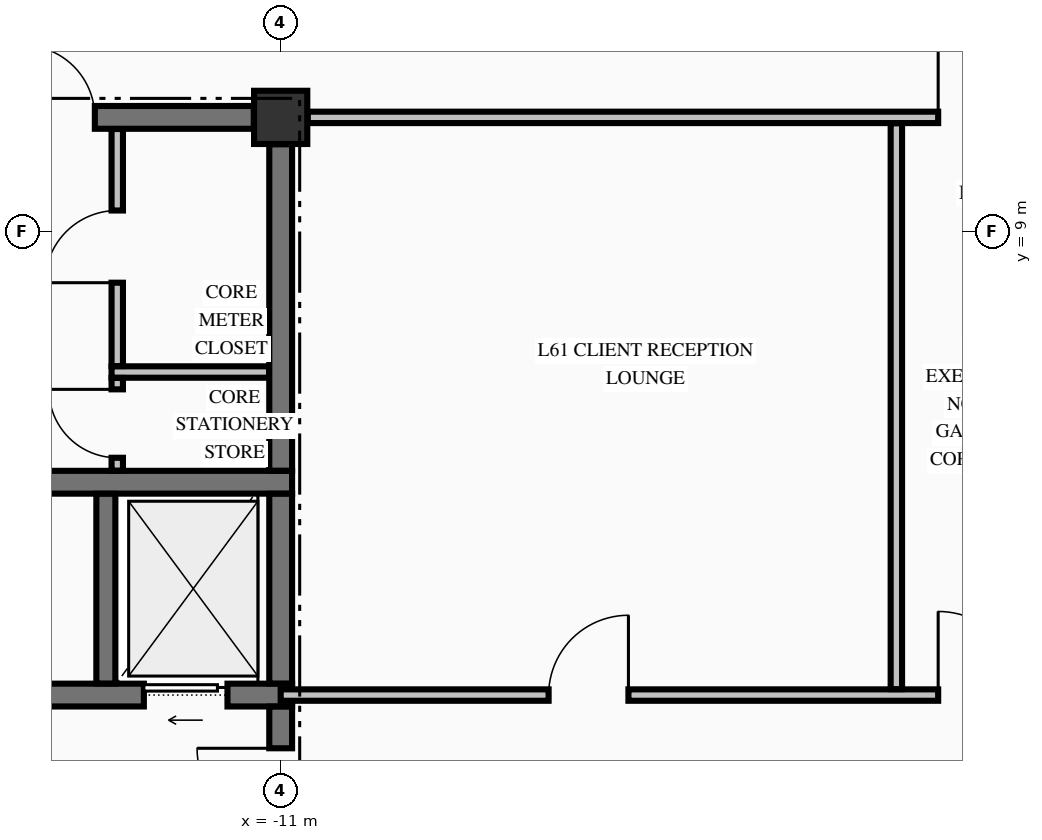
"""IFC4 building model, lengths in metres.
Left out: names, types, materials, properties, quantities, classifications, styles, units other than length and angle.
Written with IfcOpenShell. Run it as: python <this file> out.ifc"""

import sys

from ifc_helpers import new_model, si_unit, direction, frame, frame_2d, origin, origin_2d, place, context, subcontext, project, spatial, rectangle, extrude, element, fill, save


model = new_model("IFC4")
c1 = context("Model", 3, precision=1e-05, world=origin(), true_north=direction((0.0, 1.0)))
c2 = subcontext(c1, "Body", "Model", "MODEL_VIEW")
j1 = project(units=[si_unit("LENGTHUNIT", "METRE"), si_unit("PLANEANGLEUNIT", "RADIAN")], contexts=[c1])
p1 = place(None, origin())
s1 = spatial("IfcSite", under=j1, at=p1, CompositionType="ELEMENT")
p2 = place(p1, origin())
s2 = spatial("IfcBuilding", under=s1, at=p2, CompositionType="ELEMENT")
p3 = place(p2, frame((0.0, 0.0, 233.28)))
s3 = spatial("IfcBuildingStorey", under=s2, at=p3, CompositionType="ELEMENT", Elevation=233.28)
p4 = place(p3, frame((-11.0, 10.5, -0.25), z_axis=(0.0, 0.0, 1.0), x_axis=(1.0, 0.0, 0.0)))
e1 = element("IfcColumn", 1, at=p4, inside=s3, PredefinedType="COLUMN", context=c2, shape_type="SweptSolid", body=[
    extrude(rectangle(XDim=0.7, YDim=0.7, at=origin_2d()), origin(), (0.0, 0.0, 1.0), 3.23),
])
p5 = place(p3, frame((-14.875, 2.9, 0.0), z_axis=(0.0, 0.0, 1.0), x_axis=(1.0, 0.0, 0.0)))
e2 = element("IfcWall", 2, at=p5, inside=s3, PredefinedType="SHEAR", context=c2, shape_type="SweptSolid", body=[
    extrude(rectangle(XDim=4.025, YDim=0.3, at=frame_2d((2.012, 0.0))), origin(), (0.0, 0.0, 1.0), 2.98),
])
p6 = place(p5, frame((2.075, 0.0, 0.0)))
e3 = element("IfcOpeningElement", 3, at=p6, cuts=e2, PredefinedType="OPENING", context=c2, shape_type="SweptSolid", body=[
    extrude(rectangle(XDim=1.1, YDim=2.2, at=frame_2d((0.55, 1.1))), frame((0.0, 0.16, 0.0), z_axis=(0.0, -1.0, 0.0), x_axis=(1.0, 0.0, 0.0)), (0.0, 0.0, 1.0), 0.32),
])
p7 = place(p3, frame((-14.875, 5.7, 0.0), z_axis=(0.0, 0.0, 1.0), x_axis=(1.0, 0.0, 0.0)))
e4 = element("IfcWall", 4, at=p7, inside=s3, PredefinedType="SHEAR", context=c2, shape_type="SweptSolid", body=[
    extrude(rectangle(XDim=4.025, YDim=0.3, at=frame_2d((2.012, 0.0))), origin(), (0.0, 0.0, 1.0), 2.98),
])
p8 = place(p3, frame((-14.7, 10.5, 0.0), z_axis=(0.0, 0.0, 1.0), x_axis=(1.0, 0.0, 0.0)))
e5 = element("IfcWall", 5, at=p8, inside=s3, PredefinedType="SHEAR", context=c2, shape_type="SweptSolid", body=[
    extrude(rectangle(XDim=3.346, YDim=0.3, at=frame_2d((1.673, 0.0))), origin(), (0.0, 0.0, 1.0), 2.98),
])
p9 = place(p8, frame((0.305, 0.0, 0.0)))
e6 = element("IfcOpeningElement", 6, at=p9, cuts=e5, PredefinedType="OPENING", context=c2, shape_type="SweptSolid", body=[
    extrude(rectangle(XDim=0.95, YDim=2.15, at=frame_2d((0.475, 1.075))), frame((0.0, 0.16, 0.0), z_axis=(0.0, -1.0, 0.0), x_axis=(1.0, 0.0, 0.0)), (0.0, 0.0, 1.0), 0.32),
])
p10 = place(p3, frame((-11.0, 2.9, 0.0), z_axis=(0.0, 0.0, 1.0), x_axis=(1.0, 0.0, 0.0)))
e7 = element("IfcWall", 7, at=p10, inside=s3, PredefinedType="PARTITIONING", context=c2, shape_type="SweptSolid", body=[
    extrude(rectangle(XDim=22.0, YDim=0.15, at=frame_2d((11.0, 0.0))), origin(), (0.0, 0.0, 1.0), 2.98),
])
p11 = place(p10, frame((8.65, 0.0, 0.0)))
e8 = element("IfcOpeningElement", 8, at=p11, cuts=e7, PredefinedType="OPENING", context=c2, shape_type="SweptSolid", body=[
    extrude(rectangle(XDim=1.1, YDim=2.15, at=frame_2d((0.55, 1.075))), frame((0.0, 0.085, 0.0), z_axis=(0.0, -1.0, 0.0), x_axis=(1.0, 0.0, 0.0)), (0.0, 0.0, 1.0), 0.17),
])
p12 = place(p10, frame((3.525, 0.0, 0.0)))
e9 = element("IfcOpeningElement", 9, at=p12, cuts=e7, PredefinedType="OPENING", context=c2, shape_type="SweptSolid", body=[
    extrude(rectangle(XDim=1.05, YDim=2.15, at=frame_2d((0.525, 1.075))), frame((0.0, 0.085, 0.0), z_axis=(0.0, -1.0, 0.0), x_axis=(1.0, 0.0, 0.0)), (0.0, 0.0, 1.0), 0.17),
])
p13 = place(p10, frame((12.225, 0.0, 0.0)))
e10 = element("IfcOpeningElement", 10, at=p13, cuts=e7, PredefinedType="OPENING", context=c2, shape_type="SweptSolid", body=[
    extrude(rectangle(XDim=0.95, YDim=2.15, at=frame_2d((0.475, 1.075))), frame((0.0, 0.085, 0.0), z_axis=(0.0, -1.0, 0.0), x_axis=(1.0, 0.0, 0.0)), (0.0, 0.0, 1.0), 0.17),
])
p14 = place(p10, frame((18.075, 0.0, 0.0)))
e11 = element("IfcOpeningElement", 11, at=p14, cuts=e7, PredefinedType="OPENING", context=c2, shape_type="SweptSolid", body=[
    extrude(rectangle(XDim=0.95, YDim=2.15, at=frame_2d((0.475, 1.075))), frame((0.0, 0.085, 0.0), z_axis=(0.0, -1.0, 0.0), x_axis=(1.0, 0.0, 0.0)), (0.0, 0.0, 1.0), 0.17),
])
p15 = place(p3, frame((-13.225, 7.15, 0.0), z_axis=(0.0, 0.0, 1.0), x_axis=(1.0, 0.0, 0.0)))
e12 = element("IfcWall", 12, at=p15, inside=s3, PredefinedType="PARTITIONING", context=c2, shape_type="SweptSolid", body=[
    extrude(rectangle(XDim=2.072, YDim=0.15, at=frame_2d((1.036, 0.0))), origin(), (0.0, 0.0, 1.0), 2.98),
])
p16 = place(p3, frame((-10.644, 10.5, 0.0), z_axis=(0.0, 0.0, 1.0), x_axis=(1.0, 0.0, 0.0)))
e13 = element("IfcWall", 13, at=p16, inside=s3, PredefinedType="PARTITIONING", context=c2, shape_type="SweptSolid", body=[
    extrude(rectangle(XDim=21.288, YDim=0.15, at=frame_2d((10.644, 0.0))), origin(), (0.0, 0.0, 1.0), 2.98),
])
p17 = place(p16, frame((8.294, 0.0, 0.0)))
e14 = element("IfcOpeningElement", 14, at=p17, cuts=e13, PredefinedType="OPENING", context=c2, shape_type="SweptSolid", body=[
    extrude(rectangle(XDim=1.1, YDim=2.15, at=frame_2d((0.55, 1.075))), frame((0.0, 0.085, 0.0), z_axis=(0.0, -1.0, 0.0), x_axis=(1.0, 0.0, 0.0)), (0.0, 0.0, 1.0), 0.17),
])
p18 = place(p3, frame((-13.3, 3.052, 0.0), z_axis=(0.0, 0.0, 1.0), x_axis=(0.0, 1.0, 0.0)))
e15 = element("IfcWall", 15, at=p18, inside=s3, PredefinedType="SOLIDWALL", context=c2, shape_type="SweptSolid", body=[
    extrude(rectangle(XDim=2.496, YDim=0.25, at=frame_2d((1.248, 0.0))), origin(), (0.0, 0.0, 1.0), 2.98),
])
p19 = place(p3, frame((-11.0, 0.354, 0.0), z_axis=(0.0, 0.0, 1.0), x_axis=(0.0, 1.0, 0.0)))
e16 = element("IfcWall", 16, at=p19, inside=s3, PredefinedType="SHEAR", context=c2, shape_type="SweptSolid", body=[
    extrude(rectangle(XDim=2.394, YDim=0.3, at=frame_2d((1.197, 0.0))), origin(), (0.0, 0.0, 1.0), 2.98),
])
p20 = place(p19, frame((0.746, 0.0, 0.0)))
e17 = element("IfcOpeningElement", 17, at=p20, cuts=e16, PredefinedType="OPENING", context=c2, shape_type="SweptSolid", body=[
    extrude(rectangle(XDim=1.1, YDim=2.15, at=frame_2d((0.55, 1.075))), frame((0.0, 0.16, 0.0), z_axis=(0.0, -1.0, 0.0), x_axis=(1.0, 0.0, 0.0)), (0.0, 0.0, 1.0), 0.32),
])
p21 = place(p3, frame((-11.0, 3.052, 0.0), z_axis=(0.0, 0.0, 1.0), x_axis=(0.0, 1.0, 0.0)))
e18 = element("IfcWall", 18, at=p21, inside=s3, PredefinedType="SHEAR", context=c2, shape_type="SweptSolid", body=[
    extrude(rectangle(XDim=2.496, YDim=0.3, at=frame_2d((1.248, 0.0))), origin(), (0.0, 0.0, 1.0), 2.98),
])
p22 = place(p3, frame((-11.0, 5.852, 0.0), z_axis=(0.0, 0.0, 1.0), x_axis=(0.0, 1.0, 0.0)))
e19 = element("IfcWall", 19, at=p22, inside=s3, PredefinedType="SHEAR", context=c2, shape_type="SweptSolid", body=[
    extrude(rectangle(XDim=4.294, YDim=0.3, at=frame_2d((2.147, 0.0))), origin(), (0.0, 0.0, 1.0), 2.98),
])
p23 = place(p3, frame((-13.15, 5.853, 0.0), z_axis=(0.0, 0.0, 1.0), x_axis=(0.0, 1.0, 0.0)))
e20 = element("IfcWall", 20, at=p23, inside=s3, PredefinedType="PARTITIONING", context=c2, shape_type="SweptSolid", body=[
    extrude(rectangle(XDim=1.219, YDim=0.15, at=frame_2d((0.609, 0.0))), origin(), (0.0, 0.0, 1.0), 2.98),
])
p24 = place(p23, frame((0.169, 0.0, 0.0)))
e21 = element("IfcOpeningElement", 21, at=p24, cuts=e20, PredefinedType="OPENING", context=c2, shape_type="SweptSolid", body=[
    extrude(rectangle(XDim=0.9, YDim=2.15, at=frame_2d((0.45, 1.075))), frame((0.0, 0.085, 0.0), z_axis=(0.0, -1.0, 0.0), x_axis=(1.0, 0.0, 0.0)), (0.0, 0.0, 1.0), 0.17),
])
p25 = place(p3, frame((-13.15, 7.228, 0.0), z_axis=(0.0, 0.0, 1.0), x_axis=(0.0, 1.0, 0.0)))
e22 = element("IfcWall", 22, at=p25, inside=s3, PredefinedType="PARTITIONING", context=c2, shape_type="SweptSolid", body=[
    extrude(rectangle(XDim=3.119, YDim=0.15, at=frame_2d((1.56, 0.0))), origin(), (0.0, 0.0, 1.0), 2.98),
])
p26 = place(p25, frame((1.097, 0.0, 0.0)))
e23 = element("IfcOpeningElement", 23, at=p26, cuts=e22, PredefinedType="OPENING", context=c2, shape_type="SweptSolid", body=[
    extrude(rectangle(XDim=0.95, YDim=2.15, at=frame_2d((0.475, 1.075))), frame((0.0, 0.085, 0.0), z_axis=(0.0, -1.0, 0.0), x_axis=(1.0, 0.0, 0.0)), (0.0, 0.0, 1.0), 0.17),
])
p27 = place(p3, frame((-2.9, 2.978, 0.0), z_axis=(0.0, 0.0, 1.0), x_axis=(0.0, 1.0, 0.0)))
e24 = element("IfcWall", 24, at=p27, inside=s3, PredefinedType="PARTITIONING", context=c2, shape_type="SweptSolid", body=[
    extrude(rectangle(XDim=7.444, YDim=0.15, at=frame_2d((3.722, 0.0))), origin(), (0.0, 0.0, 1.0), 2.98),
])
p28 = place(p20, origin())
e25 = element("IfcDoor", 25, at=p28, inside=s3, OperationType="SINGLE_SWING_RIGHT", PredefinedType="DOOR", context=c2, shape_type="SweptSolid", body=[
    extrude(rectangle(XDim=1.1, YDim=2.15, at=frame_2d((0.55, 1.075))), frame((0.0, 0.025, 0.0), z_axis=(0.0, -1.0, 0.0), x_axis=(1.0, 0.0, 0.0)), (0.0, 0.0, 1.0), 0.05),
])
fill(e17, e25)
p29 = place(p6, origin())
e26 = element("IfcDoor", 26, at=p29, inside=s3, OperationType="SLIDING_TO_LEFT", PredefinedType="DOOR", context=c2, shape_type="SweptSolid", body=[
    extrude(rectangle(XDim=1.1, YDim=2.2, at=frame_2d((0.55, 1.1))), frame((0.0, 0.025, 0.0), z_axis=(0.0, -1.0, 0.0), x_axis=(1.0, 0.0, 0.0)), (0.0, 0.0, 1.0), 0.05),
])
fill(e3, e26)
p30 = place(p9, origin())
e27 = element("IfcDoor", 27, at=p30, inside=s3, OperationType="SINGLE_SWING_LEFT", PredefinedType="DOOR", context=c2, shape_type="SweptSolid", body=[
    extrude(rectangle(XDim=0.95, YDim=2.15, at=frame_2d((0.475, 1.075))), frame((0.0, 0.025, 0.0), z_axis=(0.0, -1.0, 0.0), x_axis=(1.0, 0.0, 0.0)), (0.0, 0.0, 1.0), 0.05),
])
fill(e6, e27)
p31 = place(p24, origin())
e28 = element("IfcDoor", 28, at=p31, inside=s3, OperationType="SINGLE_SWING_RIGHT", PredefinedType="DOOR", context=c2, shape_type="SweptSolid", body=[
    extrude(rectangle(XDim=0.9, YDim=2.15, at=frame_2d((0.45, 1.075))), frame((0.0, 0.025, 0.0), z_axis=(0.0, -1.0, 0.0), x_axis=(1.0, 0.0, 0.0)), (0.0, 0.0, 1.0), 0.05),
])
fill(e21, e28)
p32 = place(p26, origin())
e29 = element("IfcDoor", 29, at=p32, inside=s3, OperationType="SINGLE_SWING_LEFT", PredefinedType="DOOR", context=c2, shape_type="SweptSolid", body=[
    extrude(rectangle(XDim=0.95, YDim=2.15, at=frame_2d((0.475, 1.075))), frame((0.0, 0.025, 0.0), z_axis=(0.0, -1.0, 0.0), x_axis=(1.0, 0.0, 0.0)), (0.0, 0.0, 1.0), 0.05),
])
fill(e23, e29)
p33 = place(p17, origin())
e30 = element("IfcDoor", 30, at=p33, inside=s3, OperationType="SINGLE_SWING_LEFT", PredefinedType="DOOR", context=c2, shape_type="SweptSolid", body=[
    extrude(rectangle(XDim=1.1, YDim=2.15, at=frame_2d((0.55, 1.075))), frame((0.0, 0.025, 0.0), z_axis=(0.0, -1.0, 0.0), x_axis=(1.0, 0.0, 0.0)), (0.0, 0.0, 1.0), 0.05),
])
fill(e14, e30)
p34 = place(p11, origin())
e31 = element("IfcDoor", 31, at=p34, inside=s3, OperationType="SINGLE_SWING_LEFT", PredefinedType="DOOR", context=c2, shape_type="SweptSolid", body=[
    extrude(rectangle(XDim=1.1, YDim=2.15, at=frame_2d((0.55, 1.075))), frame((0.0, 0.025, 0.0), z_axis=(0.0, -1.0, 0.0), x_axis=(1.0, 0.0, 0.0)), (0.0, 0.0, 1.0), 0.05),
])
fill(e8, e31)
p35 = place(p12, origin())
e32 = element("IfcDoor", 32, at=p35, inside=s3, OperationType="SINGLE_SWING_RIGHT", PredefinedType="DOOR", context=c2, shape_type="SweptSolid", body=[
    extrude(rectangle(XDim=1.05, YDim=2.15, at=frame_2d((0.525, 1.075))), frame((0.0, 0.025, 0.0), z_axis=(0.0, -1.0, 0.0), x_axis=(1.0, 0.0, 0.0)), (0.0, 0.0, 1.0), 0.05),
])
fill(e9, e32)
save(model, sys.argv[1])
